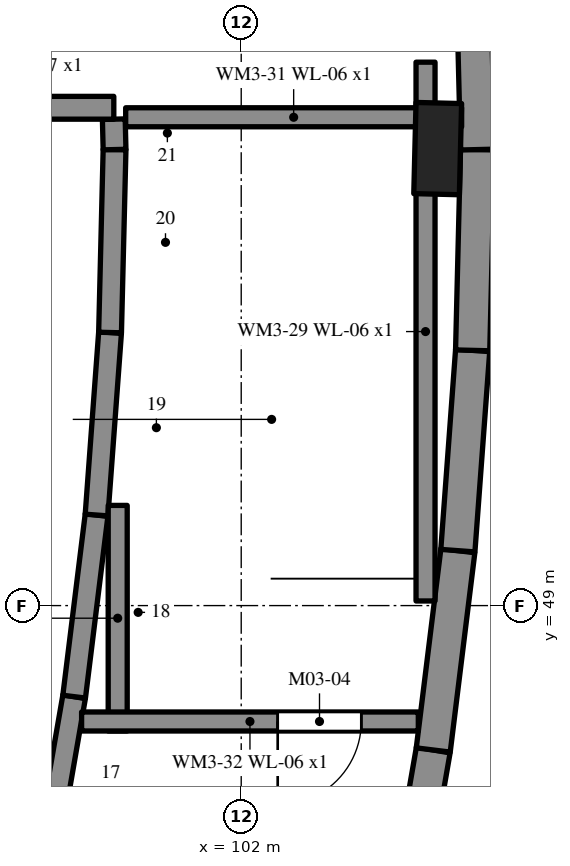
"""IFC4 building model, lengths in metres.
Left out: names, types, materials, properties, quantities, classifications, styles, units other than length and angle.
Written with IfcOpenShell. Run it as: python <this file> out.ifc"""

import sys

from ifc_helpers import new_model, si_unit, direction, frame, frame_2d, origin, origin_2d, place, context, subcontext, project, spatial, polyline, rectangle, outline, extrude, element, fill, save


model = new_model("IFC4")
c1 = context("Model", 3, precision=1e-05, world=origin(), true_north=direction((0.0, 1.0)))
c2 = subcontext(c1, "Body", "Model", "MODEL_VIEW")
j1 = project(units=[si_unit("LENGTHUNIT", "METRE"), si_unit("PLANEANGLEUNIT", "RADIAN")], contexts=[c1])
p1 = place(None, origin())
s1 = spatial("IfcSite", under=j1, at=p1, CompositionType="ELEMENT")
p2 = place(p1, origin())
s2 = spatial("IfcBuilding", under=s1, at=p2, CompositionType="ELEMENT")
p3 = place(p2, frame((0.0, 0.0, 14.8)))
s3 = spatial("IfcBuildingStorey", under=s2, at=p3, CompositionType="ELEMENT", Elevation=14.8)
p4 = place(p3, frame((104.074, 44.497, 0.0), z_axis=(0.0, 0.0, 1.0), x_axis=(0.171196910379, 0.985236833394, 0.0)))
e1 = element("IfcWall", 1, at=p4, inside=s3, PredefinedType="SOLIDWALL", context=c2, shape_type="SweptSolid", body=[
    extrude(outline(polyline([(0.0, 0.0), (2.643, 0.0), (2.643, 3.0), (2.573, 3.023), (0.078, 3.873), (0.0, 3.864), (0.0, 0.0)])), frame((0.0, 0.225, 0.0), z_axis=(0.0, -1.0, 0.0), x_axis=(1.0, 0.0, 0.0)), (0.0, 0.0, 1.0), 0.45),
])
p5 = place(p3, frame((104.527, 47.1, 0.0), z_axis=(0.0, 0.0, 1.0), x_axis=(0.122499610212, 0.992468561466, 0.0)))
e2 = element("IfcWall", 2, at=p5, inside=s3, PredefinedType="SOLIDWALL", context=c2, shape_type="SweptSolid", body=[
    extrude(outline(polyline([(0.0, 0.0), (2.643, 0.0), (2.643, 2.096), (2.556, 2.126), (0.057, 2.978), (0.0, 2.996), (0.0, 0.0)])), frame((0.0, 0.225, 0.0), z_axis=(0.0, -1.0, 0.0), x_axis=(1.0, 0.0, 0.0)), (0.0, 0.0, 1.0), 0.45),
])
p6 = place(p3, frame((104.85, 49.723, 0.0), z_axis=(0.0, 0.0, 1.0), x_axis=(0.07363685767, 0.997285121313, 0.0)))
e3 = element("IfcWall", 3, at=p6, inside=s3, PredefinedType="SOLIDWALL", context=c2, shape_type="SweptSolid", body=[
    extrude(outline(polyline([(0.0, 0.0), (2.642, 0.0), (2.643, 2.97), (2.631, 2.966), (0.0, 2.093), (0.0, 0.0)])), frame((0.0, 0.225, 0.0), z_axis=(0.0, -1.0, 0.0), x_axis=(1.0, 0.0, 0.0)), (0.0, 0.0, 1.0), 0.45),
])
p7 = place(p3, frame((105.045, 52.358, 0.0), z_axis=(0.0, 0.0, 1.0), x_axis=(0.024666736886, 0.999695729756, 0.0)))
e4 = element("IfcWall", 4, at=p7, inside=s3, PredefinedType="SOLIDWALL", context=c2, shape_type="SweptSolid", body=[
    extrude(outline(polyline([(0.0, 0.0), (2.643, 0.0), (2.643, 3.874), (2.573, 3.85), (0.0, 2.974), (0.0, 0.0)])), frame((0.0, 0.225, 0.0), z_axis=(0.0, -1.0, 0.0), x_axis=(1.0, 0.0, 0.0)), (0.0, 0.0, 1.0), 0.45),
])
p8 = place(p3, frame((105.11, 55.0, 0.0), z_axis=(0.0, 0.0, 1.0), x_axis=(-0.024666736886, 0.999695729756, 0.0)))
e5 = element("IfcWall", 5, at=p8, inside=s3, PredefinedType="SOLIDWALL", context=c2, shape_type="SweptSolid", body=[
    extrude(outline(polyline([(0.0, 0.0), (2.643, 0.0), (2.643, 2.974), (2.62, 2.981), (0.059, 3.854), (0.0, 3.874), (0.0, 0.0)])), frame((0.0, 0.225, 0.0), z_axis=(0.0, -1.0, 0.0), x_axis=(1.0, 0.0, 0.0)), (0.0, 0.0, 1.0), 0.45),
])
p9 = place(p3, frame((99.39, 45.432, 0.0), z_axis=(0.0, 0.0, 1.0), x_axis=(0.171225522804, 0.985231861209, 0.0)))
e6 = element("IfcWall", 6, at=p9, inside=s3, PredefinedType="SHEAR", context=c2, shape_type="SweptSolid", body=[
    extrude(outline(polyline([(0.0, 0.0), (2.406, 0.0), (2.405, 4.692), (1.101, 5.159), (1.009, 5.191), (0.0, 5.534), (0.0, 0.0)])), frame((0.0, 0.15, 0.0), z_axis=(0.0, -1.0, 0.0), x_axis=(1.0, 0.0, 0.0)), (0.0, 0.0, 1.0), 0.3),
])
p10 = place(p3, frame((99.802, 47.802, 0.0), z_axis=(0.0, 0.0, 1.0), x_axis=(0.122487115362, 0.992470103615, 0.0)))
e7 = element("IfcWall", 7, at=p10, inside=s3, PredefinedType="SHEAR", context=c2, shape_type="SweptSolid", body=[
    extrude(outline(polyline([(0.0, 0.0), (2.408, 0.0), (2.408, 4.493), (0.74, 4.437), (0.682, 4.458), (0.624, 4.477), (0.0, 4.689), (0.0, 0.0)])), frame((0.0, 0.15, 0.0), z_axis=(0.0, -1.0, 0.0), x_axis=(1.0, 0.0, 0.0)), (0.0, 0.0, 1.0), 0.3),
])
p11 = place(p3, frame((100.097, 50.191, 0.0), z_axis=(0.0, 0.0, 1.0), x_axis=(0.073711091533, 0.997279637306, 0.0)))
e8 = element("IfcWall", 8, at=p11, inside=s3, PredefinedType="SHEAR", context=c2, shape_type="SweptSolid", body=[
    extrude(outline(polyline([(0.0, 0.0), (2.408, 0.0), (2.408, 5.111), (0.749, 4.546), (0.696, 4.534), (0.0, 4.494), (0.0, 0.0)])), frame((0.0, 0.15, 0.0), z_axis=(0.0, -1.0, 0.0), x_axis=(1.0, 0.0, 0.0)), (0.0, 0.0, 1.0), 0.3),
])
p12 = place(p3, frame((100.274, 52.593, 0.0), z_axis=(0.0, 0.0, 1.0), x_axis=(0.024536221488, 0.999698941599, 0.0)))
e9 = element("IfcWall", 9, at=p12, inside=s3, PredefinedType="SHEAR", context=c2, shape_type="SweptSolid", body=[
    extrude(outline(polyline([(0.0, 0.0), (2.408, 0.0), (2.408, 5.943), (2.34, 5.919), (0.348, 5.24), (0.0, 5.114), (0.0, 0.0)])), frame((0.0, 0.15, 0.0), z_axis=(0.0, -1.0, 0.0), x_axis=(1.0, 0.0, 0.0)), (0.0, 0.0, 1.0), 0.3),
])
p13 = place(p3, frame((100.333, 55.0, 0.0), z_axis=(0.0, 0.0, 1.0), x_axis=(-0.024412746386, 0.999701964494, 0.0)))
e10 = element("IfcWall", 10, at=p13, inside=s3, PredefinedType="SHEAR", context=c2, shape_type="SweptSolid", body=[
    extrude(outline(polyline([(0.0, 0.0), (0.4, 0.0), (0.4, 5.806), (0.061, 5.922), (0.0, 5.943), (0.0, 0.0)])), frame((0.0, 0.15, 0.0), z_axis=(0.0, -1.0, 0.0), x_axis=(1.0, 0.0, 0.0)), (0.0, 0.0, 1.0), 0.3),
])
p14 = place(p3, frame((100.324, 55.55, 0.0), z_axis=(0.0, 0.0, 1.0), x_axis=(-1.0, 0.0, 0.0)))
e11 = element("IfcWall", 11, at=p14, inside=s3, PredefinedType="SHEAR", context=c2, shape_type="SweptSolid", body=[
    extrude(outline(polyline([(0.0, 0.0), (2.874, 0.0), (2.874, 6.991), (0.0, 5.766), (0.0, 0.0)])), frame((0.0, 0.15, 0.0), z_axis=(0.0, -1.0, 0.0), x_axis=(1.0, 0.0, 0.0)), (0.0, 0.0, 1.0), 0.3),
])
p15 = place(p3, frame((104.585, 55.013, 0.0), z_axis=(0.0, 0.0, 1.0), x_axis=(0.024571762574, 0.999698068661, 0.0)))
e12 = element("IfcColumn", 12, at=p15, inside=s3, PredefinedType="PILASTER", context=c2, shape_type="SweptSolid", body=[
    extrude(rectangle(XDim=1.2, YDim=0.6, at=origin_2d()), origin(), (0.0, 0.0, 1.0), 3.072),
])
p16 = place(p3, frame((104.425, 49.061, 0.0), z_axis=(0.0, 0.0, 1.0), x_axis=(0.0, 1.0, 0.0)))
e13 = element("IfcWall", 13, at=p16, inside=s3, PredefinedType="SHEAR", context=c2, shape_type="SweptSolid", body=[
    extrude(rectangle(XDim=7.089, YDim=0.25, at=frame_2d((3.544, 0.0))), origin(), (0.0, 0.0, 1.0), 2.232),
])
p17 = place(p3, frame((100.375, 50.318, 0.0), z_axis=(0.0, 0.0, 1.0), x_axis=(0.0, -1.0, 0.0)))
e14 = element("IfcWall", 14, at=p17, inside=s3, PredefinedType="SHEAR", context=c2, shape_type="SweptSolid", body=[
    extrude(rectangle(XDim=2.968, YDim=0.25, at=frame_2d((1.484, 0.0))), origin(), (0.0, 0.0, 1.0), 2.232),
])
p18 = place(p3, frame((100.48, 55.425, 0.0), z_axis=(0.0, 0.0, 1.0), x_axis=(1.0, 0.0, 0.0)))
e15 = element("IfcWall", 15, at=p18, inside=s3, PredefinedType="SHEAR", context=c2, shape_type="SweptSolid", body=[
    extrude(rectangle(XDim=4.42, YDim=0.25, at=frame_2d((2.21, 0.0))), origin(), (0.0, 0.0, 1.0), 2.232),
])
p19 = place(p3, frame((104.33, 47.475, 0.0), z_axis=(0.0, 0.0, 1.0), x_axis=(-1.0, 0.0, 0.0)))
e16 = element("IfcWall", 16, at=p19, inside=s3, PredefinedType="SHEAR", context=c2, shape_type="SweptSolid", body=[
    extrude(rectangle(XDim=4.43, YDim=0.25, at=frame_2d((2.215, 0.0))), origin(), (0.0, 0.0, 1.0), 2.232),
])
p20 = place(p19, frame((0.75, 0.0, 0.0)))
e17 = element("IfcOpeningElement", 17, at=p20, cuts=e16, PredefinedType="OPENING", context=c2, shape_type="SweptSolid", body=[
    extrude(rectangle(XDim=1.1, YDim=2.1, at=frame_2d((0.55, 1.05))), frame((0.0, 0.135, 0.0), z_axis=(0.0, -1.0, 0.0), x_axis=(1.0, 0.0, 0.0)), (0.0, 0.0, 1.0), 0.27),
])
p21 = place(p20, origin())
e18 = element("IfcDoor", 18, at=p21, inside=s3, OperationType="SINGLE_SWING_RIGHT", PredefinedType="DOOR", context=c2, shape_type="SweptSolid", body=[
    extrude(rectangle(XDim=1.1, YDim=2.1, at=frame_2d((0.55, 1.05))), frame((0.0, 0.025, 0.0), z_axis=(0.0, -1.0, 0.0), x_axis=(1.0, 0.0, 0.0)), (0.0, 0.0, 1.0), 0.05),
])
fill(e17, e18)
save(model, sys.argv[1])
